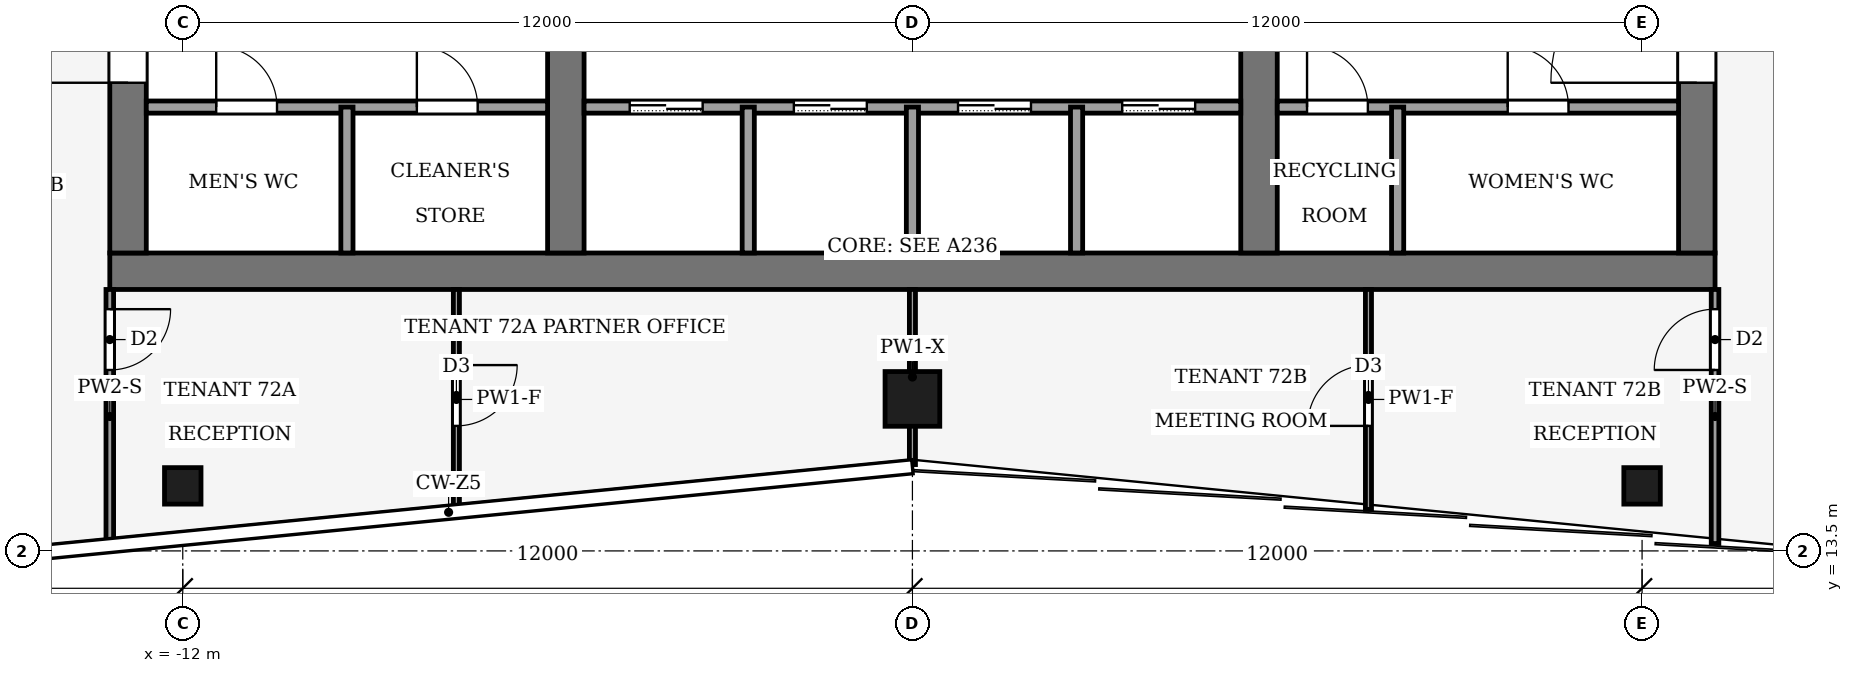
"""IFC4 building model, lengths in metres.
Left out: names, types, materials, properties, quantities, classifications, styles, units other than length and angle.
Written with IfcOpenShell. Run it as: python <this file> out.ifc"""

import sys

from ifc_helpers import new_model, si_unit, direction, frame, frame_2d, origin, origin_2d, place, context, subcontext, project, spatial, rectangle, hollow_rectangle, extrude, element, fill, save


model = new_model("IFC4")
c1 = context("Model", 3, precision=1e-05, world=origin(), true_north=direction((0.0, 1.0)))
c2 = subcontext(c1, "Body", "Model", "MODEL_VIEW")
j1 = project(units=[si_unit("LENGTHUNIT", "METRE"), si_unit("PLANEANGLEUNIT", "RADIAN")], contexts=[c1])
p1 = place(None, origin())
s1 = spatial("IfcSite", under=j1, at=p1, CompositionType="ELEMENT")
p2 = place(p1, origin())
s2 = spatial("IfcBuilding", under=s1, at=p2, CompositionType="ELEMENT")
p3 = place(p2, frame((0.0, 0.0, 314.0)))
s3 = spatial("IfcBuildingStorey", under=s2, at=p3, CompositionType="ELEMENT", Elevation=314.0)
p4 = place(p3, frame((-13.2, 18.1, -0.13), z_axis=(0.0, 0.0, 1.0), x_axis=(1.0, 0.0, 0.0)))
e1 = element("IfcWall", 1, at=p4, inside=s3, PredefinedType="SHEAR", context=c2, shape_type="SweptSolid", body=[
    extrude(rectangle(XDim=26.4, YDim=0.6, at=frame_2d((13.2, 0.0))), origin(), (0.0, 0.0, 1.0), 4.0),
])
p5 = place(p3, frame((-12.9, 18.4, -0.13), z_axis=(0.0, 0.0, 1.0), x_axis=(0.0, 1.0, 0.0)))
e2 = element("IfcWall", 2, at=p5, inside=s3, PredefinedType="SHEAR", context=c2, shape_type="SweptSolid", body=[
    extrude(rectangle(XDim=19.2, YDim=0.6, at=frame_2d((9.6, 0.0))), origin(), (0.0, 0.0, 1.0), 4.0),
])
p6 = place(p5, frame((2.8, 0.0, 0.13)))
e3 = element("IfcOpeningElement", 3, at=p6, cuts=e2, PredefinedType="OPENING", context=c2, shape_type="SweptSolid", body=[
    extrude(rectangle(XDim=2.4, YDim=2.4, at=frame_2d((1.2, 1.2))), frame((0.0, 0.31, 0.0), z_axis=(0.0, -1.0, 0.0), x_axis=(1.0, 0.0, 0.0)), (0.0, 0.0, 1.0), 0.62),
])
p7 = place(p5, frame((13.4, 0.0, 0.13)))
e4 = element("IfcOpeningElement", 4, at=p7, cuts=e2, PredefinedType="OPENING", context=c2, shape_type="SweptSolid", body=[
    extrude(rectangle(XDim=1.4, YDim=2.2, at=frame_2d((0.7, 1.1))), frame((0.0, 0.31, 0.0), z_axis=(0.0, -1.0, 0.0), x_axis=(1.0, 0.0, 0.0)), (0.0, 0.0, 1.0), 0.62),
])
p8 = place(p3, frame((12.9, 18.4, -0.13), z_axis=(0.0, 0.0, 1.0), x_axis=(0.0, 1.0, 0.0)))
e5 = element("IfcWall", 5, at=p8, inside=s3, PredefinedType="SHEAR", context=c2, shape_type="SweptSolid", body=[
    extrude(rectangle(XDim=19.2, YDim=0.6, at=frame_2d((9.6, 0.0))), origin(), (0.0, 0.0, 1.0), 4.0),
])
p9 = place(p8, frame((2.8, 0.0, 0.13)))
e6 = element("IfcOpeningElement", 6, at=p9, cuts=e5, PredefinedType="OPENING", context=c2, shape_type="SweptSolid", body=[
    extrude(rectangle(XDim=2.4, YDim=2.4, at=frame_2d((1.2, 1.2))), frame((0.0, 0.31, 0.0), z_axis=(0.0, -1.0, 0.0), x_axis=(1.0, 0.0, 0.0)), (0.0, 0.0, 1.0), 0.62),
])
p10 = place(p8, frame((13.3, 0.0, 0.13)))
e7 = element("IfcOpeningElement", 7, at=p10, cuts=e5, PredefinedType="OPENING", context=c2, shape_type="SweptSolid", body=[
    extrude(rectangle(XDim=2.4, YDim=2.4, at=frame_2d((1.2, 1.2))), frame((0.0, 0.31, 0.0), z_axis=(0.0, -1.0, 0.0), x_axis=(1.0, 0.0, 0.0)), (0.0, 0.0, 1.0), 0.62),
])
p11 = place(p3, frame((-5.7, 18.4, -0.13), z_axis=(0.0, 0.0, 1.0), x_axis=(0.0, 1.0, 0.0)))
e8 = element("IfcWall", 8, at=p11, inside=s3, PredefinedType="SHEAR", context=c2, shape_type="SweptSolid", body=[
    extrude(rectangle(XDim=19.2, YDim=0.6, at=frame_2d((9.6, 0.0))), origin(), (0.0, 0.0, 1.0), 4.0),
])
p12 = place(p11, frame((8.35, 0.0, 0.13)))
e9 = element("IfcOpeningElement", 9, at=p12, cuts=e8, PredefinedType="OPENING", context=c2, shape_type="SweptSolid", body=[
    extrude(rectangle(XDim=0.9, YDim=2.1, at=frame_2d((0.45, 1.05))), frame((0.0, 0.31, 0.0), z_axis=(0.0, -1.0, 0.0), x_axis=(1.0, 0.0, 0.0)), (0.0, 0.0, 1.0), 0.62),
])
p13 = place(p3, frame((5.7, 18.4, -0.13), z_axis=(0.0, 0.0, 1.0), x_axis=(0.0, 1.0, 0.0)))
e10 = element("IfcWall", 10, at=p13, inside=s3, PredefinedType="SHEAR", context=c2, shape_type="SweptSolid", body=[
    extrude(rectangle(XDim=19.2, YDim=0.6, at=frame_2d((9.6, 0.0))), origin(), (0.0, 0.0, 1.0), 4.0),
])
p14 = place(p13, frame((8.35, 0.0, 0.13)))
e11 = element("IfcOpeningElement", 11, at=p14, cuts=e10, PredefinedType="OPENING", context=c2, shape_type="SweptSolid", body=[
    extrude(rectangle(XDim=0.9, YDim=2.1, at=frame_2d((0.45, 1.05))), frame((0.0, 0.31, 0.0), z_axis=(0.0, -1.0, 0.0), x_axis=(1.0, 0.0, 0.0)), (0.0, 0.0, 1.0), 0.62),
])
p15 = place(p13, frame((13.3, 0.0, 0.13)))
e12 = element("IfcOpeningElement", 12, at=p15, cuts=e10, PredefinedType="OPENING", context=c2, shape_type="SweptSolid", body=[
    extrude(rectangle(XDim=2.4, YDim=2.4, at=frame_2d((1.2, 1.2))), frame((0.0, 0.31, 0.0), z_axis=(0.0, -1.0, 0.0), x_axis=(1.0, 0.0, 0.0)), (0.0, 0.0, 1.0), 0.62),
])
p16 = place(p3, frame((0.0, 16.0, 0.0), z_axis=(0.0, 0.0, 1.0), x_axis=(1.0, 0.0, 0.0)))
e13 = element("IfcColumn", 13, at=p16, inside=s3, PredefinedType="COLUMN", context=c2, shape_type="SweptSolid", body=[
    extrude(hollow_rectangle(XDim=0.9, YDim=0.9, WallThickness=0.04, at=origin_2d()), origin(), (0.0, 0.0, 1.0), 4.0),
])
for number, where, z_axis, x_axis in (
    (14, (-12.0, 14.57, 0.0), (0.0, 0.0, 1.0), (1.0, 0.0, 0.0)),
    (15, (12.0, 14.57, 0.0), (0.0, 0.0, 1.0), (1.0, 0.0, 0.0)),
):
    element("IfcColumn", number, at=place(p3, frame(where, z_axis=z_axis, x_axis=x_axis)), inside=s3, PredefinedType="COLUMN", context=c2, shape_type="SweptSolid", body=[
        extrude(hollow_rectangle(XDim=0.6, YDim=0.6, WallThickness=0.025, at=origin_2d()), origin(), (0.0, 0.0, 1.0), 4.0),
    ])
p17 = place(p3, frame((-12.6, 20.8, 0.0), z_axis=(0.0, 0.0, 1.0), x_axis=(1.0, 0.0, 0.0)))
e16 = element("IfcWall", 16, at=p17, inside=s3, PredefinedType="PARTITIONING", context=c2, shape_type="SweptSolid", body=[
    extrude(rectangle(XDim=6.6, YDim=0.2, at=frame_2d((3.3, 0.0))), origin(), (0.0, 0.0, 1.0), 3.87),
])
p18 = place(p17, frame((1.15, 0.0, 0.0)))
e17 = element("IfcOpeningElement", 17, at=p18, cuts=e16, PredefinedType="OPENING", context=c2, shape_type="SweptSolid", body=[
    extrude(rectangle(XDim=1.0, YDim=2.1, at=frame_2d((0.5, 1.05))), frame((0.0, 0.11, 0.0), z_axis=(0.0, -1.0, 0.0), x_axis=(1.0, 0.0, 0.0)), (0.0, 0.0, 1.0), 0.22),
])
p19 = place(p17, frame((4.45, 0.0, 0.0)))
e18 = element("IfcOpeningElement", 18, at=p19, cuts=e16, PredefinedType="OPENING", context=c2, shape_type="SweptSolid", body=[
    extrude(rectangle(XDim=1.0, YDim=2.1, at=frame_2d((0.5, 1.05))), frame((0.0, 0.11, 0.0), z_axis=(0.0, -1.0, 0.0), x_axis=(1.0, 0.0, 0.0)), (0.0, 0.0, 1.0), 0.22),
])
p20 = place(p3, frame((-5.4, 20.8, 0.0), z_axis=(0.0, 0.0, 1.0), x_axis=(1.0, 0.0, 0.0)))
e19 = element("IfcWall", 19, at=p20, inside=s3, PredefinedType="PARTITIONING", context=c2, shape_type="SweptSolid", body=[
    extrude(rectangle(XDim=10.8, YDim=0.2, at=frame_2d((5.4, 0.0))), origin(), (0.0, 0.0, 1.0), 3.87),
])
p21 = place(p20, frame((0.75, 0.0, 0.0)))
e20 = element("IfcOpeningElement", 20, at=p21, cuts=e19, PredefinedType="OPENING", context=c2, shape_type="SweptSolid", body=[
    extrude(rectangle(XDim=1.2, YDim=2.2, at=frame_2d((0.6, 1.1))), frame((0.0, 0.11, 0.0), z_axis=(0.0, -1.0, 0.0), x_axis=(1.0, 0.0, 0.0)), (0.0, 0.0, 1.0), 0.22),
])
p22 = place(p20, frame((3.45, 0.0, 0.0)))
e21 = element("IfcOpeningElement", 21, at=p22, cuts=e19, PredefinedType="OPENING", context=c2, shape_type="SweptSolid", body=[
    extrude(rectangle(XDim=1.2, YDim=2.2, at=frame_2d((0.6, 1.1))), frame((0.0, 0.11, 0.0), z_axis=(0.0, -1.0, 0.0), x_axis=(1.0, 0.0, 0.0)), (0.0, 0.0, 1.0), 0.22),
])
p23 = place(p20, frame((6.15, 0.0, 0.0)))
e22 = element("IfcOpeningElement", 22, at=p23, cuts=e19, PredefinedType="OPENING", context=c2, shape_type="SweptSolid", body=[
    extrude(rectangle(XDim=1.2, YDim=2.2, at=frame_2d((0.6, 1.1))), frame((0.0, 0.11, 0.0), z_axis=(0.0, -1.0, 0.0), x_axis=(1.0, 0.0, 0.0)), (0.0, 0.0, 1.0), 0.22),
])
p24 = place(p20, frame((8.85, 0.0, 0.0)))
e23 = element("IfcOpeningElement", 23, at=p24, cuts=e19, PredefinedType="OPENING", context=c2, shape_type="SweptSolid", body=[
    extrude(rectangle(XDim=1.2, YDim=2.2, at=frame_2d((0.6, 1.1))), frame((0.0, 0.11, 0.0), z_axis=(0.0, -1.0, 0.0), x_axis=(1.0, 0.0, 0.0)), (0.0, 0.0, 1.0), 0.22),
])
p25 = place(p3, frame((6.0, 20.8, 0.0), z_axis=(0.0, 0.0, 1.0), x_axis=(1.0, 0.0, 0.0)))
e24 = element("IfcWall", 24, at=p25, inside=s3, PredefinedType="PARTITIONING", context=c2, shape_type="SweptSolid", body=[
    extrude(rectangle(XDim=6.6, YDim=0.2, at=frame_2d((3.3, 0.0))), origin(), (0.0, 0.0, 1.0), 3.87),
])
p26 = place(p25, frame((0.49, 0.0, 0.0)))
e25 = element("IfcOpeningElement", 25, at=p26, cuts=e24, PredefinedType="OPENING", context=c2, shape_type="SweptSolid", body=[
    extrude(rectangle(XDim=1.0, YDim=2.1, at=frame_2d((0.5, 1.05))), frame((0.0, 0.11, 0.0), z_axis=(0.0, -1.0, 0.0), x_axis=(1.0, 0.0, 0.0)), (0.0, 0.0, 1.0), 0.22),
])
p27 = place(p25, frame((3.79, 0.0, 0.0)))
e26 = element("IfcOpeningElement", 26, at=p27, cuts=e24, PredefinedType="OPENING", context=c2, shape_type="SweptSolid", body=[
    extrude(rectangle(XDim=1.0, YDim=2.1, at=frame_2d((0.5, 1.05))), frame((0.0, 0.11, 0.0), z_axis=(0.0, -1.0, 0.0), x_axis=(1.0, 0.0, 0.0)), (0.0, 0.0, 1.0), 0.22),
])
for number, where, z_axis, x_axis in (
    (27, (-9.3, 18.4, 0.0), (0.0, 0.0, 1.0), (0.0, 1.0, 0.0)),
    (28, (-2.7, 18.4, 0.0), (0.0, 0.0, 1.0), (0.0, 1.0, 0.0)),
    (29, (0.0, 18.4, 0.0), (0.0, 0.0, 1.0), (0.0, 1.0, 0.0)),
    (30, (2.7, 18.4, 0.0), (0.0, 0.0, 1.0), (0.0, 1.0, 0.0)),
    (31, (7.98, 18.4, 0.0), (0.0, 0.0, 1.0), (0.0, 1.0, 0.0)),
):
    element("IfcWall", number, at=place(p3, frame(where, z_axis=z_axis, x_axis=x_axis)), inside=s3, PredefinedType="PARTITIONING", context=c2, shape_type="SweptSolid", body=[
        extrude(rectangle(XDim=2.4, YDim=0.2, at=frame_2d((1.2, 0.0))), origin(), (0.0, 0.0, 1.0), 3.87),
    ])
p28 = place(p3, frame((-13.2, 17.8, 0.0), z_axis=(0.0, 0.0, 1.0), x_axis=(0.0, -1.0, 0.0)))
e32 = element("IfcWall", 32, at=p28, inside=s3, PredefinedType="PARTITIONING", context=c2, shape_type="SweptSolid", body=[
    extrude(rectangle(XDim=4.178, YDim=0.125, at=frame_2d((2.089, 0.0))), origin(), (0.0, 0.0, 1.0), 3.04),
])
p29 = place(p28, frame((0.324, 0.0, 0.0)))
e33 = element("IfcOpeningElement", 33, at=p29, cuts=e32, PredefinedType="OPENING", context=c2, shape_type="SweptSolid", body=[
    extrude(rectangle(XDim=1.0, YDim=2.1, at=frame_2d((0.5, 1.05))), frame((0.0, 0.073, 0.0), z_axis=(0.0, -1.0, 0.0), x_axis=(1.0, 0.0, 0.0)), (0.0, 0.0, 1.0), 0.145),
])
p30 = place(p3, frame((13.2, 13.622, 0.0), z_axis=(0.0, 0.0, 1.0), x_axis=(0.0, 1.0, 0.0)))
e34 = element("IfcWall", 34, at=p30, inside=s3, PredefinedType="PARTITIONING", context=c2, shape_type="SweptSolid", body=[
    extrude(rectangle(XDim=4.178, YDim=0.125, at=frame_2d((2.089, 0.0))), origin(), (0.0, 0.0, 1.0), 3.04),
])
p31 = place(p30, frame((2.854, 0.0, 0.0)))
e35 = element("IfcOpeningElement", 35, at=p31, cuts=e34, PredefinedType="OPENING", context=c2, shape_type="SweptSolid", body=[
    extrude(rectangle(XDim=1.0, YDim=2.1, at=frame_2d((0.5, 1.05))), frame((0.0, 0.073, 0.0), z_axis=(0.0, -1.0, 0.0), x_axis=(1.0, 0.0, 0.0)), (0.0, 0.0, 1.0), 0.145),
])
p32 = place(p3, frame((-7.5, 17.8, 0.0), z_axis=(0.0, 0.0, 1.0), x_axis=(0.0, -1.0, 0.0)))
e36 = element("IfcWall", 36, at=p32, inside=s3, PredefinedType="PARTITIONING", context=c2, shape_type="SweptSolid", body=[
    extrude(rectangle(XDim=3.618, YDim=0.1, at=frame_2d((1.809, 0.0))), origin(), (0.0, 0.0, 1.0), 3.04),
])
p33 = place(p32, frame((1.244, 0.0, 0.0)))
e37 = element("IfcOpeningElement", 37, at=p33, cuts=e36, PredefinedType="OPENING", context=c2, shape_type="SweptSolid", body=[
    extrude(rectangle(XDim=1.0, YDim=2.1, at=frame_2d((0.5, 1.05))), frame((0.0, 0.06, 0.0), z_axis=(0.0, -1.0, 0.0), x_axis=(1.0, 0.0, 0.0)), (0.0, 0.0, 1.0), 0.12),
])
p34 = place(p3, frame((0.0, 14.92, 0.0), z_axis=(0.0, 0.0, 1.0), x_axis=(0.0, 1.0, 0.0)))
e38 = element("IfcWall", 38, at=p34, inside=s3, PredefinedType="PARTITIONING", context=c2, shape_type="SweptSolid", body=[
    extrude(rectangle(XDim=2.88, YDim=0.1, at=frame_2d((1.44, 0.0))), origin(), (0.0, 0.0, 1.0), 3.54),
])
p35 = place(p3, frame((7.5, 14.182, 0.0), z_axis=(0.0, 0.0, 1.0), x_axis=(0.0, 1.0, 0.0)))
e39 = element("IfcWall", 39, at=p35, inside=s3, PredefinedType="PARTITIONING", context=c2, shape_type="SweptSolid", body=[
    extrude(rectangle(XDim=3.618, YDim=0.1, at=frame_2d((1.809, 0.0))), origin(), (0.0, 0.0, 1.0), 3.04),
])
p36 = place(p35, frame((1.374, 0.0, 0.0)))
e40 = element("IfcOpeningElement", 40, at=p36, cuts=e39, PredefinedType="OPENING", context=c2, shape_type="SweptSolid", body=[
    extrude(rectangle(XDim=1.0, YDim=2.1, at=frame_2d((0.5, 1.05))), frame((0.0, 0.06, 0.0), z_axis=(0.0, -1.0, 0.0), x_axis=(1.0, 0.0, 0.0)), (0.0, 0.0, 1.0), 0.12),
])
p37 = place(p21, origin())
e41 = element("IfcDoor", 41, at=p37, inside=s3, OperationType="SLIDING_TO_LEFT", PredefinedType="DOOR", context=c2, shape_type="SweptSolid", body=[
    extrude(rectangle(XDim=1.2, YDim=2.2, at=frame_2d((0.6, 1.1))), frame((0.0, 0.025, 0.0), z_axis=(0.0, -1.0, 0.0), x_axis=(1.0, 0.0, 0.0)), (0.0, 0.0, 1.0), 0.05),
])
fill(e20, e41)
p38 = place(p22, origin())
e42 = element("IfcDoor", 42, at=p38, inside=s3, OperationType="SLIDING_TO_LEFT", PredefinedType="DOOR", context=c2, shape_type="SweptSolid", body=[
    extrude(rectangle(XDim=1.2, YDim=2.2, at=frame_2d((0.6, 1.1))), frame((0.0, 0.025, 0.0), z_axis=(0.0, -1.0, 0.0), x_axis=(1.0, 0.0, 0.0)), (0.0, 0.0, 1.0), 0.05),
])
fill(e21, e42)
p39 = place(p23, origin())
e43 = element("IfcDoor", 43, at=p39, inside=s3, OperationType="SLIDING_TO_LEFT", PredefinedType="DOOR", context=c2, shape_type="SweptSolid", body=[
    extrude(rectangle(XDim=1.2, YDim=2.2, at=frame_2d((0.6, 1.1))), frame((0.0, 0.025, 0.0), z_axis=(0.0, -1.0, 0.0), x_axis=(1.0, 0.0, 0.0)), (0.0, 0.0, 1.0), 0.05),
])
fill(e22, e43)
p40 = place(p24, origin())
e44 = element("IfcDoor", 44, at=p40, inside=s3, OperationType="SLIDING_TO_LEFT", PredefinedType="DOOR", context=c2, shape_type="SweptSolid", body=[
    extrude(rectangle(XDim=1.2, YDim=2.2, at=frame_2d((0.6, 1.1))), frame((0.0, 0.025, 0.0), z_axis=(0.0, -1.0, 0.0), x_axis=(1.0, 0.0, 0.0)), (0.0, 0.0, 1.0), 0.05),
])
fill(e23, e44)
p41 = place(p18, origin())
e45 = element("IfcDoor", 45, at=p41, inside=s3, OperationType="SINGLE_SWING_LEFT", PredefinedType="DOOR", context=c2, shape_type="SweptSolid", body=[
    extrude(rectangle(XDim=1.0, YDim=2.1, at=frame_2d((0.5, 1.05))), frame((0.0, 0.025, 0.0), z_axis=(0.0, -1.0, 0.0), x_axis=(1.0, 0.0, 0.0)), (0.0, 0.0, 1.0), 0.05),
])
fill(e17, e45)
p42 = place(p19, origin())
e46 = element("IfcDoor", 46, at=p42, inside=s3, OperationType="SINGLE_SWING_LEFT", PredefinedType="DOOR", context=c2, shape_type="SweptSolid", body=[
    extrude(rectangle(XDim=1.0, YDim=2.1, at=frame_2d((0.5, 1.05))), frame((0.0, 0.025, 0.0), z_axis=(0.0, -1.0, 0.0), x_axis=(1.0, 0.0, 0.0)), (0.0, 0.0, 1.0), 0.05),
])
fill(e18, e46)
p43 = place(p26, origin())
e47 = element("IfcDoor", 47, at=p43, inside=s3, OperationType="SINGLE_SWING_RIGHT", PredefinedType="DOOR", context=c2, shape_type="SweptSolid", body=[
    extrude(rectangle(XDim=1.0, YDim=2.1, at=frame_2d((0.5, 1.05))), frame((0.0, 0.025, 0.0), z_axis=(0.0, -1.0, 0.0), x_axis=(1.0, 0.0, 0.0)), (0.0, 0.0, 1.0), 0.05),
])
fill(e25, e47)
p44 = place(p27, origin())
e48 = element("IfcDoor", 48, at=p44, inside=s3, OperationType="SINGLE_SWING_RIGHT", PredefinedType="DOOR", context=c2, shape_type="SweptSolid", body=[
    extrude(rectangle(XDim=1.0, YDim=2.1, at=frame_2d((0.5, 1.05))), frame((0.0, 0.025, 0.0), z_axis=(0.0, -1.0, 0.0), x_axis=(1.0, 0.0, 0.0)), (0.0, 0.0, 1.0), 0.05),
])
fill(e26, e48)
p45 = place(p6, origin())
e49 = element("IfcDoor", 49, at=p45, inside=s3, OperationType="DOUBLE_DOOR_SINGLE_SWING", PredefinedType="DOOR", context=c2, shape_type="SweptSolid", body=[
    extrude(rectangle(XDim=2.4, YDim=2.4, at=frame_2d((1.2, 1.2))), frame((0.0, 0.025, 0.0), z_axis=(0.0, -1.0, 0.0), x_axis=(1.0, 0.0, 0.0)), (0.0, 0.0, 1.0), 0.05),
])
fill(e3, e49)
p46 = place(p9, origin())
e50 = element("IfcDoor", 50, at=p46, inside=s3, OperationType="DOUBLE_DOOR_SINGLE_SWING", PredefinedType="DOOR", context=c2, shape_type="SweptSolid", body=[
    extrude(rectangle(XDim=2.4, YDim=2.4, at=frame_2d((1.2, 1.2))), frame((0.0, 0.025, 0.0), z_axis=(0.0, -1.0, 0.0), x_axis=(1.0, 0.0, 0.0)), (0.0, 0.0, 1.0), 0.05),
])
fill(e6, e50)
p47 = place(p29, origin())
e51 = element("IfcDoor", 51, at=p47, inside=s3, OperationType="SINGLE_SWING_LEFT", PredefinedType="DOOR", context=c2, shape_type="SweptSolid", body=[
    extrude(rectangle(XDim=1.0, YDim=2.1, at=frame_2d((0.5, 1.05))), frame((0.0, 0.025, 0.0), z_axis=(0.0, -1.0, 0.0), x_axis=(1.0, 0.0, 0.0)), (0.0, 0.0, 1.0), 0.05),
])
fill(e33, e51)
p48 = place(p31, origin())
e52 = element("IfcDoor", 52, at=p48, inside=s3, OperationType="SINGLE_SWING_RIGHT", PredefinedType="DOOR", context=c2, shape_type="SweptSolid", body=[
    extrude(rectangle(XDim=1.0, YDim=2.1, at=frame_2d((0.5, 1.05))), frame((0.0, 0.025, 0.0), z_axis=(0.0, -1.0, 0.0), x_axis=(1.0, 0.0, 0.0)), (0.0, 0.0, 1.0), 0.05),
])
fill(e35, e52)
p49 = place(p33, origin())
e53 = element("IfcDoor", 53, at=p49, inside=s3, OperationType="SINGLE_SWING_LEFT", PredefinedType="DOOR", context=c2, shape_type="SweptSolid", body=[
    extrude(rectangle(XDim=1.0, YDim=2.1, at=frame_2d((0.5, 1.05))), frame((0.0, 0.025, 0.0), z_axis=(0.0, -1.0, 0.0), x_axis=(1.0, 0.0, 0.0)), (0.0, 0.0, 1.0), 0.05),
])
fill(e37, e53)
p50 = place(p36, origin())
e54 = element("IfcDoor", 54, at=p50, inside=s3, OperationType="SINGLE_SWING_RIGHT", PredefinedType="DOOR", context=c2, shape_type="SweptSolid", body=[
    extrude(rectangle(XDim=1.0, YDim=2.1, at=frame_2d((0.5, 1.05))), frame((0.0, 0.025, 0.0), z_axis=(0.0, -1.0, 0.0), x_axis=(1.0, 0.0, 0.0)), (0.0, 0.0, 1.0), 0.05),
])
fill(e40, e54)
save(model, sys.argv[1])
